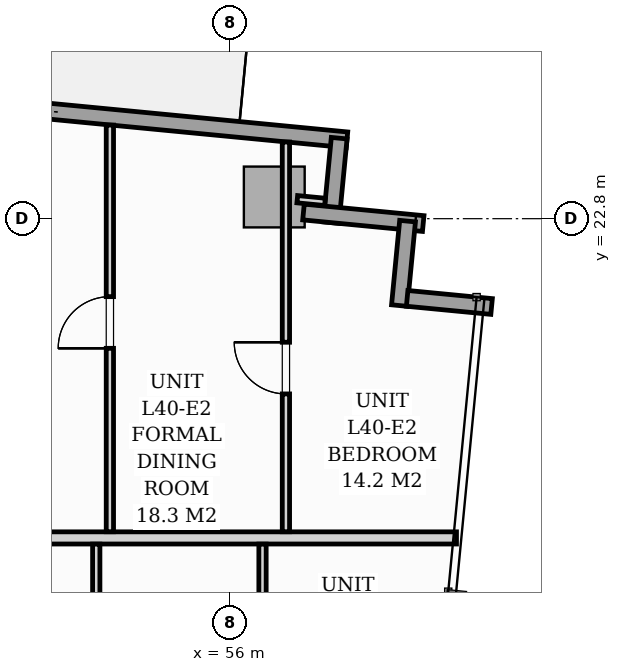
"""IFC4 building model, lengths in metres.
Left out: names, types, materials, properties, quantities, classifications, styles, units other than length and angle.
Written with IfcOpenShell. Run it as: python <this file> out.ifc"""

import sys

from ifc_helpers import new_model, si_unit, direction, frame, frame_2d, origin, origin_2d, place, context, subcontext, project, spatial, rectangle, extrude, source, transform, mapped, element, fill, save


model = new_model("IFC4")
c1 = context("Model", 3, precision=1e-05, world=origin(), true_north=direction((0.0, 1.0)))
c2 = subcontext(c1, "Body", "Model", "MODEL_VIEW")
j1 = project(units=[si_unit("LENGTHUNIT", "METRE"), si_unit("PLANEANGLEUNIT", "RADIAN")], contexts=[c1])
p1 = place(None, origin())
s1 = spatial("IfcSite", under=j1, at=p1, CompositionType="ELEMENT")
p2 = place(p1, origin())
s2 = spatial("IfcBuilding", under=s1, at=p2, CompositionType="ELEMENT")
p3 = place(p2, frame((0.0, 0.0, 140.6)))
s3 = spatial("IfcBuildingStorey", under=s2, at=p3, CompositionType="ELEMENT", Elevation=140.6)
m1 = source(origin(), c2, "Body", "SweptSolid", [
    extrude(rectangle(XDim=1.0, YDim=1.0, at=origin_2d()), origin(), (0.0, 0.0, 1.0), 3.196),
])
p4 = place(p3, frame((56.719, 23.157, 0.002), z_axis=(0.0, 0.0, 1.0), x_axis=(0.995396198367, -0.09584575252, 0.0)))
e1 = element("IfcColumn", 1, at=p4, inside=s3, PredefinedType="COLUMN", context=c2, shape_type="MappedRepresentation", body=[
    mapped(m1, transform((0.0, 0.0, 0.0), scale=1.0)),
])
p5 = place(p3, frame((40.983, 25.727, 0.0), z_axis=(0.0, 0.0, 1.0), x_axis=(0.995395844771, -0.095849424686, 0.0)))
e2 = element("IfcWall", 2, at=p5, inside=s3, PredefinedType="STANDARD", context=c2, shape_type="SweptSolid", body=[
    extrude(rectangle(XDim=17.01, YDim=0.26, at=frame_2d((8.505, 0.0))), origin(), (0.0, 0.0, 1.0), 2.94),
])
p6 = place(p5, frame((9.62, 0.0, 0.0)))
e3 = element("IfcOpeningElement", 3, at=p6, cuts=e2, PredefinedType="OPENING", context=c2, shape_type="SweptSolid", body=[
    extrude(rectangle(XDim=1.8, YDim=2.06, at=frame_2d((0.9, 1.03))), frame((0.0, 0.14, 0.0), z_axis=(0.0, -1.0, 0.0), x_axis=(1.0, 0.0, 0.0)), (0.0, 0.0, 1.0), 0.28),
])
p7 = place(p5, frame((0.7, 0.0, 0.65)))
e4 = element("IfcOpeningElement", 4, at=p7, cuts=e2, PredefinedType="OPENING", context=c2, shape_type="SweptSolid", body=[
    extrude(rectangle(XDim=1.6, YDim=1.5, at=frame_2d((0.8, 0.75))), frame((0.0, 0.14, 0.0), z_axis=(0.0, -1.0, 0.0), x_axis=(1.0, 0.0, 0.0)), (0.0, 0.0, 1.0), 0.28),
])
p8 = place(p3, frame((57.787, 24.124, 0.0), z_axis=(0.0, 0.0, 1.0), x_axis=(-0.095915846097, -0.995389446633, 0.0)))
e5 = element("IfcWall", 5, at=p8, inside=s3, PredefinedType="STANDARD", context=c2, shape_type="SweptSolid", body=[
    extrude(rectangle(XDim=1.395, YDim=0.26, at=frame_2d((0.697, 0.0))), origin(), (0.0, 0.0, 1.0), 2.94),
])
p9 = place(p3, frame((57.2, 22.909, 0.0), z_axis=(0.0, 0.0, 1.0), x_axis=(0.995401789159, -0.095787672171, 0.0)))
e6 = element("IfcWall", 6, at=p9, inside=s3, PredefinedType="STANDARD", context=c2, shape_type="SweptSolid", body=[
    extrude(rectangle(XDim=1.978, YDim=0.26, at=frame_2d((0.989, 0.0))), origin(), (0.0, 0.0, 1.0), 2.94),
])
for number, where, z_axis, x_axis in (
    (7, (58.912, 22.76, 0.0), (0.0, 0.0, 1.0), (-0.096, -0.995, 0.0)),
    (8, (58.905, 21.49, 0.0), (0.0, 0.0, 1.0), (0.995, -0.096, 0.0)),
):
    element("IfcWall", number, at=place(p3, frame(where, z_axis=z_axis, x_axis=x_axis)), inside=s3, PredefinedType="STANDARD", context=c2, shape_type="SweptSolid", body=[
        extrude(rectangle(XDim=1.395, YDim=0.26, at=frame_2d((0.698, 0.0))), origin(), (0.0, 0.0, 1.0), 2.94),
    ])
p10 = place(p3, frame((47.782, 17.55, 0.0), z_axis=(0.0, 0.0, 1.0), x_axis=(1.0, 0.0, 0.0)))
e9 = element("IfcWall", 9, at=p10, inside=s3, PredefinedType="PARTITIONING", context=c2, shape_type="SweptSolid", body=[
    extrude(rectangle(XDim=11.934, YDim=0.2, at=frame_2d((5.967, 0.0))), origin(), (0.0, 0.0, 1.0), 2.94),
])
p11 = place(p3, frame((56.526, 6.189, 0.0), z_axis=(0.0, 0.0, 1.0), x_axis=(0.0, 1.0, 0.0)))
e10 = element("IfcWall", 10, at=p11, inside=s3, PredefinedType="PARTITIONING", context=c2, shape_type="SweptSolid", body=[
    extrude(rectangle(XDim=11.259, YDim=0.12, at=frame_2d((5.629, 0.0))), origin(), (0.0, 0.0, 1.0), 2.94),
])
p12 = place(p11, frame((5.064, 0.0, 0.0)))
e11 = element("IfcOpeningElement", 11, at=p12, cuts=e10, PredefinedType="OPENING", context=c2, shape_type="SweptSolid", body=[
    extrude(rectangle(XDim=0.85, YDim=2.05, at=frame_2d((0.425, 1.025))), frame((0.0, 0.07, 0.0), z_axis=(0.0, -1.0, 0.0), x_axis=(1.0, 0.0, 0.0)), (0.0, 0.0, 1.0), 0.14),
])
p13 = place(p3, frame((53.792, 7.081, 0.0), z_axis=(0.0, 0.0, 1.0), x_axis=(0.0, 1.0, 0.0)))
e12 = element("IfcWall", 12, at=p13, inside=s3, PredefinedType="PARTITIONING", context=c2, shape_type="SweptSolid", body=[
    extrude(rectangle(XDim=10.367, YDim=0.12, at=frame_2d((5.184, 0.0))), origin(), (0.0, 0.0, 1.0), 2.94),
])
p14 = place(p13, frame((4.758, 0.0, 0.0)))
e13 = element("IfcOpeningElement", 13, at=p14, cuts=e12, PredefinedType="OPENING", context=c2, shape_type="SweptSolid", body=[
    extrude(rectangle(XDim=0.85, YDim=2.05, at=frame_2d((0.425, 1.025))), frame((0.0, 0.07, 0.0), z_axis=(0.0, -1.0, 0.0), x_axis=(1.0, 0.0, 0.0)), (0.0, 0.0, 1.0), 0.14),
])
p15 = place(p3, frame((56.911, 17.652, 0.0), z_axis=(0.0, 0.0, 1.0), x_axis=(0.0, 1.0, 0.0)))
e14 = element("IfcWall", 14, at=p15, inside=s3, PredefinedType="PARTITIONING", context=c2, shape_type="SweptSolid", body=[
    extrude(rectangle(XDim=6.408, YDim=0.12, at=frame_2d((3.204, 0.0))), origin(), (0.0, 0.0, 1.0), 2.382),
])
p16 = place(p15, frame((2.266, 0.0, 0.0)))
e15 = element("IfcOpeningElement", 15, at=p16, cuts=e14, PredefinedType="OPENING", context=c2, shape_type="SweptSolid", body=[
    extrude(rectangle(XDim=0.85, YDim=2.05, at=frame_2d((0.425, 1.025))), frame((0.0, 0.07, 0.0), z_axis=(0.0, -1.0, 0.0), x_axis=(1.0, 0.0, 0.0)), (0.0, 0.0, 1.0), 0.14),
])
p17 = place(p3, frame((54.016, 17.652, 0.0), z_axis=(0.0, 0.0, 1.0), x_axis=(0.0, 1.0, 0.0)))
e16 = element("IfcWall", 16, at=p17, inside=s3, PredefinedType="PARTITIONING", context=c2, shape_type="SweptSolid", body=[
    extrude(rectangle(XDim=6.687, YDim=0.12, at=frame_2d((3.344, 0.0))), origin(), (0.0, 0.0, 1.0), 2.94),
])
p18 = place(p17, frame((3.016, 0.0, 0.0)))
e17 = element("IfcOpeningElement", 17, at=p18, cuts=e16, PredefinedType="OPENING", context=c2, shape_type="SweptSolid", body=[
    extrude(rectangle(XDim=0.85, YDim=2.05, at=frame_2d((0.425, 1.025))), frame((0.0, 0.07, 0.0), z_axis=(0.0, -1.0, 0.0), x_axis=(1.0, 0.0, 0.0)), (0.0, 0.0, 1.0), 0.14),
])
p19 = place(p3, frame((57.098, 23.12, 0.0), z_axis=(0.0, 0.0, 1.0), x_axis=(0.995384576284, -0.09596637586, 0.0)))
e18 = element("IfcWall", 18, at=p19, inside=s3, PredefinedType="PARTITIONING", context=c2, shape_type="SweptSolid", body=[
    extrude(rectangle(XDim=0.458, YDim=0.12, at=frame_2d((0.229, 0.0))), origin(), (0.0, 0.0, 1.0), 2.94),
])
m2 = source(origin(), c2, "Body", "SweptSolid", [
    extrude(rectangle(XDim=0.85, YDim=2.05, at=frame_2d((0.425, 1.025))), frame((0.0, 0.025, 0.0), z_axis=(0.0, -1.0, 0.0), x_axis=(1.0, 0.0, 0.0)), (0.0, 0.0, 1.0), 0.05),
])
p20 = place(p16, origin())
e19 = element("IfcDoor", 19, at=p20, inside=s3, OperationType="SINGLE_SWING_RIGHT", PredefinedType="DOOR", context=c2, shape_type="MappedRepresentation", body=[
    mapped(m2, transform((0.0, 0.0, 0.0), scale=1.0)),
])
fill(e15, e19)
p21 = place(p18, origin())
e20 = element("IfcDoor", 20, at=p21, inside=s3, OperationType="SINGLE_SWING_LEFT", PredefinedType="DOOR", context=c2, shape_type="MappedRepresentation", body=[
    mapped(m2, transform((0.0, 0.0, 0.0), scale=1.0)),
])
fill(e17, e20)
save(model, sys.argv[1])
